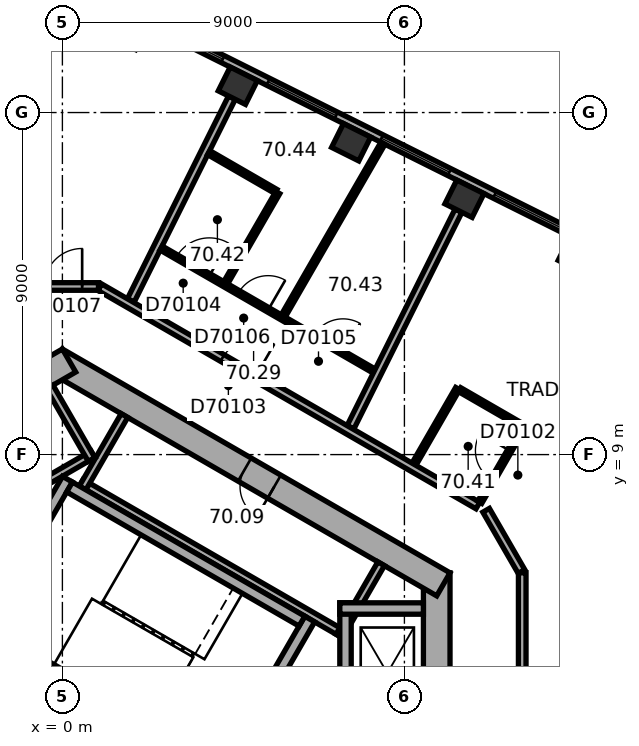
"""IFC4 building model, lengths in metres.
Left out: names, types, materials, properties, quantities, classifications, styles, units other than length and angle.
Written with IfcOpenShell. Run it as: python <this file> out.ifc"""

import sys

from ifc_helpers import new_model, si_unit, direction, frame, frame_2d, origin, origin_2d, place, context, subcontext, project, spatial, rectangle, extrude, element, fill, save


model = new_model("IFC4")
c1 = context("Model", 3, precision=1e-05, world=origin(), true_north=direction((0.0, 1.0)))
c2 = subcontext(c1, "Body", "Model", "MODEL_VIEW")
j1 = project(units=[si_unit("LENGTHUNIT", "METRE"), si_unit("PLANEANGLEUNIT", "RADIAN")], contexts=[c1])
p1 = place(None, origin())
s1 = spatial("IfcSite", under=j1, at=p1, CompositionType="ELEMENT")
p2 = place(p1, origin())
s2 = spatial("IfcBuilding", under=s1, at=p2, CompositionType="ELEMENT")
p3 = place(p2, frame((0.0, 0.0, 285.7)))
s3 = spatial("IfcBuildingStorey", under=s2, at=p3, CompositionType="ELEMENT", Elevation=285.7)
for number, where, z_axis, x_axis in (
    (1, (13.561, 14.246, 0.0), (0.0, 0.0, 1.0), (-0.895, 0.446, 0.0)),
    (2, (10.58, 15.732, 0.0), (0.0, 0.0, 1.0), (-0.895, 0.446, 0.0)),
    (3, (7.598, 17.219, 0.0), (0.0, 0.0, 1.0), (-0.895, 0.446, 0.0)),
    (4, (4.616, 18.706, 0.0), (0.0, 0.0, 1.0), (-0.895, 0.446, 0.0)),
):
    element("IfcColumn", number, at=place(p3, frame(where, z_axis=z_axis, x_axis=x_axis)), inside=s3, PredefinedType="COLUMN", context=c2, shape_type="SweptSolid", body=[
        extrude(rectangle(XDim=0.8, YDim=0.7, at=origin_2d()), origin(), (0.0, 0.0, 1.0), 3.7),
    ])
p4 = place(p3, frame((9.85, -5.889, 0.0), z_axis=(0.0, 0.0, 1.0), x_axis=(0.0, 1.0, 0.0)))
e5 = element("IfcWall", 5, at=p4, inside=s3, PredefinedType="SHEAR", context=c2, shape_type="SweptSolid", body=[
    extrude(rectangle(XDim=11.778, YDim=0.7, at=frame_2d((5.889, 0.0))), origin(), (0.0, 0.0, 1.0), 3.7),
])
p5 = place(p4, frame((6.089, 0.0, 0.0)))
e6 = element("IfcOpeningElement", 6, at=p5, cuts=e5, PredefinedType="OPENING", context=c2, shape_type="SweptSolid", body=[
    extrude(rectangle(XDim=1.5, YDim=2.1, at=frame_2d((0.75, 1.05))), frame((0.0, 0.36, 0.0), z_axis=(0.0, -1.0, 0.0), x_axis=(1.0, 0.0, 0.0)), (0.0, 0.0, 1.0), 0.72),
])
p6 = place(p4, frame((2.939, 0.0, 0.0)))
e7 = element("IfcOpeningElement", 7, at=p6, cuts=e5, PredefinedType="OPENING", context=c2, shape_type="SweptSolid", body=[
    extrude(rectangle(XDim=0.9, YDim=2.1, at=frame_2d((0.45, 1.05))), frame((0.0, 0.36, 0.0), z_axis=(0.0, -1.0, 0.0), x_axis=(1.0, 0.0, 0.0)), (0.0, 0.0, 1.0), 0.72),
])
p7 = place(p3, frame((10.025, 5.586, 0.0), z_axis=(0.0, 0.0, 1.0), x_axis=(-0.866026453023, 0.499998182661, 0.0)))
e8 = element("IfcWall", 8, at=p7, inside=s3, PredefinedType="SHEAR", context=c2, shape_type="SweptSolid", body=[
    extrude(rectangle(XDim=11.778, YDim=0.7, at=frame_2d((5.889, 0.0))), origin(), (0.0, 0.0, 1.0), 3.7),
])
p8 = place(p7, frame((5.139, 0.0, 0.0)))
e9 = element("IfcOpeningElement", 9, at=p8, cuts=e8, PredefinedType="OPENING", context=c2, shape_type="SweptSolid", body=[
    extrude(rectangle(XDim=0.9, YDim=2.1, at=frame_2d((0.45, 1.05))), frame((0.0, 0.36, 0.0), z_axis=(0.0, -1.0, 0.0), x_axis=(1.0, 0.0, 0.0)), (0.0, 0.0, 1.0), 0.72),
])
p9 = place(p3, frame((0.175, 11.475, 0.0), z_axis=(0.0, 0.0, 1.0), x_axis=(-0.866026453023, -0.499998182661, 0.0)))
e10 = element("IfcWall", 10, at=p9, inside=s3, PredefinedType="SHEAR", context=c2, shape_type="SweptSolid", body=[
    extrude(rectangle(XDim=11.778, YDim=0.7, at=frame_2d((5.889, 0.0))), origin(), (0.0, 0.0, 1.0), 3.7),
])
p10 = place(p9, frame((6.089, 0.0, 0.0)))
e11 = element("IfcOpeningElement", 11, at=p10, cuts=e10, PredefinedType="OPENING", context=c2, shape_type="SweptSolid", body=[
    extrude(rectangle(XDim=1.5, YDim=2.1, at=frame_2d((0.75, 1.05))), frame((0.0, 0.36, 0.0), z_axis=(0.0, -1.0, 0.0), x_axis=(1.0, 0.0, 0.0)), (0.0, 0.0, 1.0), 0.72),
])
p11 = place(p9, frame((2.939, 0.0, 0.0)))
e12 = element("IfcOpeningElement", 12, at=p11, cuts=e10, PredefinedType="OPENING", context=c2, shape_type="SweptSolid", body=[
    extrude(rectangle(XDim=0.9, YDim=2.1, at=frame_2d((0.45, 1.05))), frame((0.0, 0.36, 0.0), z_axis=(0.0, -1.0, 0.0), x_axis=(1.0, 0.0, 0.0)), (0.0, 0.0, 1.0), 0.72),
])
p12 = place(p3, frame((17.223, 12.923, 0.0), z_axis=(0.0, 0.0, 1.0), x_axis=(-0.894930561148, 0.44620543556, 0.0)))
e13 = element("IfcWall", 13, at=p12, inside=s3, PredefinedType="STANDARD", context=c2, shape_type="SweptSolid", body=[
    extrude(rectangle(XDim=17.731, YDim=0.2, at=frame_2d((8.866, 0.0))), origin(), (0.0, 0.0, 1.0), 3.7),
])
p13 = place(p12, frame((1.202, 0.0, 0.9)))
e14 = element("IfcOpeningElement", 14, at=p13, cuts=e13, PredefinedType="OPENING", context=c2, shape_type="SweptSolid", body=[
    extrude(rectangle(XDim=2.0, YDim=2.0, at=frame_2d((1.0, 1.0))), frame((0.0, 0.11, 0.0), z_axis=(0.0, -1.0, 0.0), x_axis=(1.0, 0.0, 0.0)), (0.0, 0.0, 1.0), 0.22),
])
p14 = place(p12, frame((4.533, 0.0, 0.9)))
e15 = element("IfcOpeningElement", 15, at=p14, cuts=e13, PredefinedType="OPENING", context=c2, shape_type="SweptSolid", body=[
    extrude(rectangle(XDim=2.0, YDim=2.0, at=frame_2d((1.0, 1.0))), frame((0.0, 0.11, 0.0), z_axis=(0.0, -1.0, 0.0), x_axis=(1.0, 0.0, 0.0)), (0.0, 0.0, 1.0), 0.22),
])
p15 = place(p12, frame((7.865, 0.0, 0.9)))
e16 = element("IfcOpeningElement", 16, at=p15, cuts=e13, PredefinedType="OPENING", context=c2, shape_type="SweptSolid", body=[
    extrude(rectangle(XDim=2.0, YDim=2.0, at=frame_2d((1.0, 1.0))), frame((0.0, 0.11, 0.0), z_axis=(0.0, -1.0, 0.0), x_axis=(1.0, 0.0, 0.0)), (0.0, 0.0, 1.0), 0.22),
])
p16 = place(p12, frame((11.197, 0.0, 0.9)))
e17 = element("IfcOpeningElement", 17, at=p16, cuts=e13, PredefinedType="OPENING", context=c2, shape_type="SweptSolid", body=[
    extrude(rectangle(XDim=2.0, YDim=2.0, at=frame_2d((1.0, 1.0))), frame((0.0, 0.11, 0.0), z_axis=(0.0, -1.0, 0.0), x_axis=(1.0, 0.0, 0.0)), (0.0, 0.0, 1.0), 0.22),
])
p17 = place(p12, frame((14.528, 0.0, 0.9)))
e18 = element("IfcOpeningElement", 18, at=p17, cuts=e13, PredefinedType="OPENING", context=c2, shape_type="SweptSolid", body=[
    extrude(rectangle(XDim=2.0, YDim=2.0, at=frame_2d((1.0, 1.0))), frame((0.0, 0.11, 0.0), z_axis=(0.0, -1.0, 0.0), x_axis=(1.0, 0.0, 0.0)), (0.0, 0.0, 1.0), 0.22),
])
p18 = place(p3, frame((7.424, 4.259, 0.0), z_axis=(0.0, 0.0, 1.0), x_axis=(-0.866026010844, 0.49999894854, 0.0)))
e19 = element("IfcWall", 19, at=p18, inside=s3, PredefinedType="PARTITIONING", context=c2, shape_type="SweptSolid", body=[
    extrude(rectangle(XDim=8.0, YDim=0.2, at=frame_2d((4.0, 0.0))), origin(), (0.0, 0.0, 1.0), 3.42),
])
for number, where, z_axis, x_axis in (
    (20, (7.287, 4.222, 0.0), (0.0, 0.0, 1.0), (0.5, 0.866, 0.0)),
    (21, (0.532, 8.122, 0.0), (0.0, 0.0, 1.0), (0.5, 0.866, 0.0)),
):
    element("IfcWall", number, at=place(p3, frame(where, z_axis=z_axis, x_axis=x_axis)), inside=s3, PredefinedType="PARTITIONING", context=c2, shape_type="SweptSolid", body=[
        extrude(rectangle(XDim=2.2, YDim=0.2, at=frame_2d((1.1, 0.0))), origin(), (0.0, 0.0, 1.0), 3.42),
    ])
p19 = place(p3, frame((0.803, 9.009, 0.0), z_axis=(0.0, 0.0, 1.0), x_axis=(-0.866028230842, -0.499995103361, 0.0)))
e22 = element("IfcWall", 22, at=p19, inside=s3, PredefinedType="PARTITIONING", context=c2, shape_type="SweptSolid", body=[
    extrude(rectangle(XDim=5.4, YDim=0.2, at=frame_2d((2.7, 0.0))), origin(), (0.0, 0.0, 1.0), 3.42),
])
p20 = place(p3, frame((0.767, 8.872, 0.0), z_axis=(0.0, 0.0, 1.0), x_axis=(-0.499994660107, 0.866028486751, 0.0)))
e23 = element("IfcWall", 23, at=p20, inside=s3, PredefinedType="PARTITIONING", context=c2, shape_type="SweptSolid", body=[
    extrude(rectangle(XDim=2.2, YDim=0.2, at=frame_2d((1.1, 0.0))), origin(), (0.0, 0.0, 1.0), 3.42),
])
p21 = place(p3, frame((4.158, 0.602, 0.0), z_axis=(0.0, 0.0, 1.0), x_axis=(0.499977259774, 0.866038532462, 0.0)))
e24 = element("IfcWall", 24, at=p21, inside=s3, PredefinedType="SHEAR", context=c2, shape_type="SweptSolid", body=[
    extrude(rectangle(XDim=4.7, YDim=0.3, at=frame_2d((2.35, 0.0))), origin(), (0.0, 0.0, 1.0), 3.42),
])
p22 = place(p21, frame((0.8, 0.0, 0.0)))
e25 = element("IfcOpeningElement", 25, at=p22, cuts=e24, PredefinedType="OPENING", context=c2, shape_type="SweptSolid", body=[
    extrude(rectangle(XDim=1.2, YDim=2.1, at=frame_2d((0.6, 1.05))), frame((0.0, 0.16, 0.0), z_axis=(0.0, -1.0, 0.0), x_axis=(1.0, 0.0, 0.0)), (0.0, 0.0, 1.0), 0.32),
])
p23 = place(p3, frame((-2.216, 4.282, 0.0), z_axis=(0.0, 0.0, 1.0), x_axis=(0.499977259774, 0.866038532462, 0.0)))
e26 = element("IfcWall", 26, at=p23, inside=s3, PredefinedType="SHEAR", context=c2, shape_type="SweptSolid", body=[
    extrude(rectangle(XDim=4.7, YDim=0.3, at=frame_2d((2.35, 0.0))), origin(), (0.0, 0.0, 1.0), 3.42),
])
for number, where, z_axis, x_axis in (
    (27, (4.103, 0.807, 0.0), (0.0, 0.0, 1.0), (-0.866, 0.5, 0.0)),
    (28, (6.303, 4.617, 0.0), (0.0, 0.0, 1.0), (-0.866, 0.5, 0.0)),
):
    element("IfcWall", number, at=place(p3, frame(where, z_axis=z_axis, x_axis=x_axis)), inside=s3, PredefinedType="SHEAR", context=c2, shape_type="SweptSolid", body=[
        extrude(rectangle(XDim=7.06, YDim=0.3, at=frame_2d((3.53, 0.0))), origin(), (0.0, 0.0, 1.0), 3.42),
    ])
p24 = place(p3, frame((7.45, 1.75, 0.0), z_axis=(0.0, 0.0, 1.0), x_axis=(0.0, 1.0, 0.0)))
e29 = element("IfcWall", 29, at=p24, inside=s3, PredefinedType="SHEAR", context=c2, shape_type="SweptSolid", body=[
    extrude(rectangle(XDim=3.35, YDim=0.3, at=frame_2d((1.675, 0.0))), origin(), (0.0, 0.0, 1.0), 3.42),
])
p25 = place(p3, frame((7.3, 4.95, 0.0), z_axis=(0.0, 0.0, 1.0), x_axis=(1.0, 0.0, 0.0)))
e30 = element("IfcWall", 30, at=p25, inside=s3, PredefinedType="SHEAR", context=c2, shape_type="SweptSolid", body=[
    extrude(rectangle(XDim=2.2, YDim=0.3, at=frame_2d((1.1, 0.0))), origin(), (0.0, 0.0, 1.0), 3.42),
])
p26 = place(p3, frame((0.95, 13.423, 0.0), z_axis=(0.0, 0.0, 1.0), x_axis=(-1.0, 0.0, 0.0)))
e31 = element("IfcWall", 31, at=p26, inside=s3, PredefinedType="PARTITIONING", context=c2, shape_type="SweptSolid", body=[
    extrude(rectangle(XDim=1.86, YDim=0.2, at=frame_2d((0.93, 0.0))), origin(), (0.0, 0.0, 1.0), 3.42),
])
p27 = place(p26, frame((0.43, 0.0, 0.0)))
e32 = element("IfcOpeningElement", 32, at=p27, cuts=e31, PredefinedType="OPENING", context=c2, shape_type="SweptSolid", body=[
    extrude(rectangle(XDim=1.0, YDim=2.1, at=frame_2d((0.5, 1.05))), frame((0.0, 0.11, 0.0), z_axis=(0.0, -1.0, 0.0), x_axis=(1.0, 0.0, 0.0)), (0.0, 0.0, 1.0), 0.22),
])
p28 = place(p3, frame((4.299, 13.522, 0.0), z_axis=(0.0, 0.0, 1.0), x_axis=(0.499982138324, 0.866035715982, 0.0)))
e33 = element("IfcWall", 33, at=p28, inside=s3, PredefinedType="PARTITIONING", context=c2, shape_type="SweptSolid", body=[
    extrude(rectangle(XDim=2.74, YDim=0.12, at=frame_2d((1.37, 0.0))), origin(), (0.0, 0.0, 1.0), 3.42),
])
p29 = place(p3, frame((4.46, 18.392, 0.0), z_axis=(0.0, 0.0, 1.0), x_axis=(-0.446197360024, -0.894934587502, 0.0)))
e34 = element("IfcWall", 34, at=p29, inside=s3, PredefinedType="PARTITIONING", context=c2, shape_type="SweptSolid", body=[
    extrude(rectangle(XDim=5.96, YDim=0.2, at=frame_2d((2.98, 0.0))), origin(), (0.0, 0.0, 1.0), 2.87),
])
p30 = place(p3, frame((5.617, 15.925, 0.0), z_axis=(0.0, 0.0, 1.0), x_axis=(-0.866010195725, 0.500026340207, 0.0)))
e35 = element("IfcWall", 35, at=p30, inside=s3, PredefinedType="PARTITIONING", context=c2, shape_type="SweptSolid", body=[
    extrude(rectangle(XDim=2.04, YDim=0.12, at=frame_2d((1.02, 0.0))), origin(), (0.0, 0.0, 1.0), 3.42),
])
p31 = place(p3, frame((8.207, 11.197, 0.0), z_axis=(0.0, 0.0, 1.0), x_axis=(-0.866030514021, 0.499991148707, 0.0)))
e36 = element("IfcWall", 36, at=p31, inside=s3, PredefinedType="PARTITIONING", context=c2, shape_type="SweptSolid", body=[
    extrude(rectangle(XDim=6.476, YDim=0.12, at=frame_2d((3.238, 0.0))), origin(), (0.0, 0.0, 1.0), 3.42),
])
p32 = place(p31, frame((5.011, 0.0, 0.0)))
e37 = element("IfcOpeningElement", 37, at=p32, cuts=e36, PredefinedType="OPENING", context=c2, shape_type="SweptSolid", body=[
    extrude(rectangle(XDim=1.0, YDim=2.1, at=frame_2d((0.5, 1.05))), frame((0.0, 0.07, 0.0), z_axis=(0.0, -1.0, 0.0), x_axis=(1.0, 0.0, 0.0)), (0.0, 0.0, 1.0), 0.14),
])
p33 = place(p31, frame((0.95, 0.0, 0.0)))
e38 = element("IfcOpeningElement", 38, at=p33, cuts=e36, PredefinedType="OPENING", context=c2, shape_type="SweptSolid", body=[
    extrude(rectangle(XDim=0.9, YDim=2.1, at=frame_2d((0.45, 1.05))), frame((0.0, 0.07, 0.0), z_axis=(0.0, -1.0, 0.0), x_axis=(1.0, 0.0, 0.0)), (0.0, 0.0, 1.0), 0.14),
])
p34 = place(p31, frame((3.223, 0.0, 0.0)))
e39 = element("IfcOpeningElement", 39, at=p34, cuts=e36, PredefinedType="OPENING", context=c2, shape_type="SweptSolid", body=[
    extrude(rectangle(XDim=0.9, YDim=2.1, at=frame_2d((0.45, 1.05))), frame((0.0, 0.07, 0.0), z_axis=(0.0, -1.0, 0.0), x_axis=(1.0, 0.0, 0.0)), (0.0, 0.0, 1.0), 0.14),
])
p35 = place(p3, frame((8.435, 17.192, 0.0), z_axis=(0.0, 0.0, 1.0), x_axis=(-0.499982949935, -0.86603524742, 0.0)))
e40 = element("IfcWall", 40, at=p35, inside=s3, PredefinedType="PARTITIONING", context=c2, shape_type="SweptSolid", body=[
    extrude(rectangle(XDim=5.246, YDim=0.12, at=frame_2d((2.623, 0.0))), origin(), (0.0, 0.0, 1.0), 3.42),
])
p36 = place(p3, frame((9.251, 8.746, 0.0), z_axis=(0.0, 0.0, 1.0), x_axis=(0.499998129301, 0.86602648383, 0.0)))
e41 = element("IfcWall", 41, at=p36, inside=s3, PredefinedType="PARTITIONING", context=c2, shape_type="SweptSolid", body=[
    extrude(rectangle(XDim=2.3, YDim=0.12, at=frame_2d((1.15, 0.0))), origin(), (0.0, 0.0, 1.0), 3.42),
])
p37 = place(p3, frame((10.423, 15.419, 0.0), z_axis=(0.0, 0.0, 1.0), x_axis=(-0.446201045829, -0.89493274982, 0.0)))
e42 = element("IfcWall", 42, at=p37, inside=s3, PredefinedType="PARTITIONING", context=c2, shape_type="SweptSolid", body=[
    extrude(rectangle(XDim=6.367, YDim=0.2, at=frame_2d((3.184, 0.0))), origin(), (0.0, 0.0, 1.0), 2.87),
])
p38 = place(p3, frame((10.453, 10.708, 0.0), z_axis=(0.0, 0.0, 1.0), x_axis=(0.865988597889, -0.500063744262, 0.0)))
e43 = element("IfcWall", 43, at=p38, inside=s3, PredefinedType="PARTITIONING", context=c2, shape_type="SweptSolid", body=[
    extrude(rectangle(XDim=1.94, YDim=0.12, at=frame_2d((0.97, 0.0))), origin(), (0.0, 0.0, 1.0), 3.42),
])
p39 = place(p3, frame((10.934, 7.659, 0.0), z_axis=(0.0, 0.0, 1.0), x_axis=(-0.866030932647, 0.499990423607, 0.0)))
e44 = element("IfcWall", 44, at=p39, inside=s3, PredefinedType="PARTITIONING", context=c2, shape_type="SweptSolid", body=[
    extrude(rectangle(XDim=11.488, YDim=0.2, at=frame_2d((5.744, 0.0))), origin(), (0.0, 0.0, 1.0), 3.42),
])
p40 = place(p39, frame((6.764, 0.0, 0.0)))
e45 = element("IfcOpeningElement", 45, at=p40, cuts=e44, PredefinedType="OPENING", context=c2, shape_type="SweptSolid", body=[
    extrude(rectangle(XDim=1.0, YDim=2.1, at=frame_2d((0.5, 1.05))), frame((0.0, 0.11, 0.0), z_axis=(0.0, -1.0, 0.0), x_axis=(1.0, 0.0, 0.0)), (0.0, 0.0, 1.0), 0.22),
])
p41 = place(p3, frame((12.08, 5.924, 0.0), z_axis=(0.0, 0.0, 1.0), x_axis=(-0.500063286585, 0.865988862174, 0.0)))
e46 = element("IfcWall", 46, at=p41, inside=s3, PredefinedType="PARTITIONING", context=c2, shape_type="SweptSolid", body=[
    extrude(rectangle(XDim=1.86, YDim=0.2, at=frame_2d((0.93, 0.0))), origin(), (0.0, 0.0, 1.0), 3.42),
])
p42 = place(p3, frame((12.1, 2.448, 0.0), z_axis=(0.0, 0.0, 1.0), x_axis=(0.0, 1.0, 0.0)))
e47 = element("IfcWall", 47, at=p42, inside=s3, PredefinedType="PARTITIONING", context=c2, shape_type="SweptSolid", body=[
    extrude(rectangle(XDim=3.441, YDim=0.2, at=frame_2d((1.72, 0.0))), origin(), (0.0, 0.0, 1.0), 3.42),
])
p43 = place(p3, frame((12.104, 9.686, 0.0), z_axis=(0.0, 0.0, 1.0), x_axis=(-0.500077830873, -0.865980463445, 0.0)))
e48 = element("IfcWall", 48, at=p43, inside=s3, PredefinedType="PARTITIONING", context=c2, shape_type="SweptSolid", body=[
    extrude(rectangle(XDim=2.24, YDim=0.12, at=frame_2d((1.12, 0.0))), origin(), (0.0, 0.0, 1.0), 3.42),
])
p44 = place(p43, frame((0.67, 0.0, 0.0)))
e49 = element("IfcOpeningElement", 49, at=p44, cuts=e48, PredefinedType="OPENING", context=c2, shape_type="SweptSolid", body=[
    extrude(rectangle(XDim=0.9, YDim=2.1, at=frame_2d((0.45, 1.05))), frame((0.0, 0.07, 0.0), z_axis=(0.0, -1.0, 0.0), x_axis=(1.0, 0.0, 0.0)), (0.0, 0.0, 1.0), 0.14),
])
p45 = place(p14, origin())
e50 = element("IfcWindow", 50, at=p45, inside=s3, PartitioningType="SINGLE_PANEL", PredefinedType="WINDOW", context=c2, shape_type="SweptSolid", body=[
    extrude(rectangle(XDim=2.0, YDim=2.0, at=frame_2d((1.0, 1.0))), frame((0.0, 0.03, 0.0), z_axis=(0.0, -1.0, 0.0), x_axis=(1.0, 0.0, 0.0)), (0.0, 0.0, 1.0), 0.06),
])
fill(e15, e50)
p46 = place(p15, origin())
e51 = element("IfcWindow", 51, at=p46, inside=s3, PartitioningType="SINGLE_PANEL", PredefinedType="WINDOW", context=c2, shape_type="SweptSolid", body=[
    extrude(rectangle(XDim=2.0, YDim=2.0, at=frame_2d((1.0, 1.0))), frame((0.0, 0.03, 0.0), z_axis=(0.0, -1.0, 0.0), x_axis=(1.0, 0.0, 0.0)), (0.0, 0.0, 1.0), 0.06),
])
fill(e16, e51)
p47 = place(p16, origin())
e52 = element("IfcWindow", 52, at=p47, inside=s3, PartitioningType="SINGLE_PANEL", PredefinedType="WINDOW", context=c2, shape_type="SweptSolid", body=[
    extrude(rectangle(XDim=2.0, YDim=2.0, at=frame_2d((1.0, 1.0))), frame((0.0, 0.03, 0.0), z_axis=(0.0, -1.0, 0.0), x_axis=(1.0, 0.0, 0.0)), (0.0, 0.0, 1.0), 0.06),
])
fill(e17, e52)
p48 = place(p17, origin())
e53 = element("IfcWindow", 53, at=p48, inside=s3, PartitioningType="SINGLE_PANEL", PredefinedType="WINDOW", context=c2, shape_type="SweptSolid", body=[
    extrude(rectangle(XDim=2.0, YDim=2.0, at=frame_2d((1.0, 1.0))), frame((0.0, 0.03, 0.0), z_axis=(0.0, -1.0, 0.0), x_axis=(1.0, 0.0, 0.0)), (0.0, 0.0, 1.0), 0.06),
])
fill(e18, e53)
p49 = place(p8, origin())
e54 = element("IfcDoor", 54, at=p49, inside=s3, OperationType="SINGLE_SWING_LEFT", PredefinedType="DOOR", context=c2, shape_type="SweptSolid", body=[
    extrude(rectangle(XDim=0.9, YDim=2.1, at=frame_2d((0.45, 1.05))), frame((0.0, 0.025, 0.0), z_axis=(0.0, -1.0, 0.0), x_axis=(1.0, 0.0, 0.0)), (0.0, 0.0, 1.0), 0.05),
])
fill(e9, e54)
p50 = place(p44, origin())
e55 = element("IfcDoor", 55, at=p50, inside=s3, OperationType="SINGLE_SWING_LEFT", PredefinedType="DOOR", context=c2, shape_type="SweptSolid", body=[
    extrude(rectangle(XDim=0.9, YDim=2.1, at=frame_2d((0.45, 1.05))), frame((0.0, 0.025, 0.0), z_axis=(0.0, -1.0, 0.0), x_axis=(1.0, 0.0, 0.0)), (0.0, 0.0, 1.0), 0.05),
])
fill(e49, e55)
p51 = place(p40, origin())
e56 = element("IfcDoor", 56, at=p51, inside=s3, OperationType="SINGLE_SWING_LEFT", PredefinedType="DOOR", context=c2, shape_type="SweptSolid", body=[
    extrude(rectangle(XDim=1.0, YDim=2.1, at=frame_2d((0.5, 1.05))), frame((0.0, 0.025, 0.0), z_axis=(0.0, -1.0, 0.0), x_axis=(1.0, 0.0, 0.0)), (0.0, 0.0, 1.0), 0.05),
])
fill(e45, e56)
p52 = place(p32, origin())
e57 = element("IfcDoor", 57, at=p52, inside=s3, OperationType="SINGLE_SWING_LEFT", PredefinedType="DOOR", context=c2, shape_type="SweptSolid", body=[
    extrude(rectangle(XDim=1.0, YDim=2.1, at=frame_2d((0.5, 1.05))), frame((0.0, 0.025, 0.0), z_axis=(0.0, -1.0, 0.0), x_axis=(1.0, 0.0, 0.0)), (0.0, 0.0, 1.0), 0.05),
])
fill(e37, e57)
p53 = place(p33, origin())
e58 = element("IfcDoor", 58, at=p53, inside=s3, OperationType="SINGLE_SWING_LEFT", PredefinedType="DOOR", context=c2, shape_type="SweptSolid", body=[
    extrude(rectangle(XDim=0.9, YDim=2.1, at=frame_2d((0.45, 1.05))), frame((0.0, 0.025, 0.0), z_axis=(0.0, -1.0, 0.0), x_axis=(1.0, 0.0, 0.0)), (0.0, 0.0, 1.0), 0.05),
])
fill(e38, e58)
p54 = place(p34, origin())
e59 = element("IfcDoor", 59, at=p54, inside=s3, OperationType="SINGLE_SWING_LEFT", PredefinedType="DOOR", context=c2, shape_type="SweptSolid", body=[
    extrude(rectangle(XDim=0.9, YDim=2.1, at=frame_2d((0.45, 1.05))), frame((0.0, 0.025, 0.0), z_axis=(0.0, -1.0, 0.0), x_axis=(1.0, 0.0, 0.0)), (0.0, 0.0, 1.0), 0.05),
])
fill(e39, e59)
p55 = place(p27, origin())
e60 = element("IfcDoor", 60, at=p55, inside=s3, OperationType="SINGLE_SWING_LEFT", PredefinedType="DOOR", context=c2, shape_type="SweptSolid", body=[
    extrude(rectangle(XDim=1.0, YDim=2.1, at=frame_2d((0.5, 1.05))), frame((0.0, 0.025, 0.0), z_axis=(0.0, -1.0, 0.0), x_axis=(1.0, 0.0, 0.0)), (0.0, 0.0, 1.0), 0.05),
])
fill(e32, e60)
save(model, sys.argv[1])
